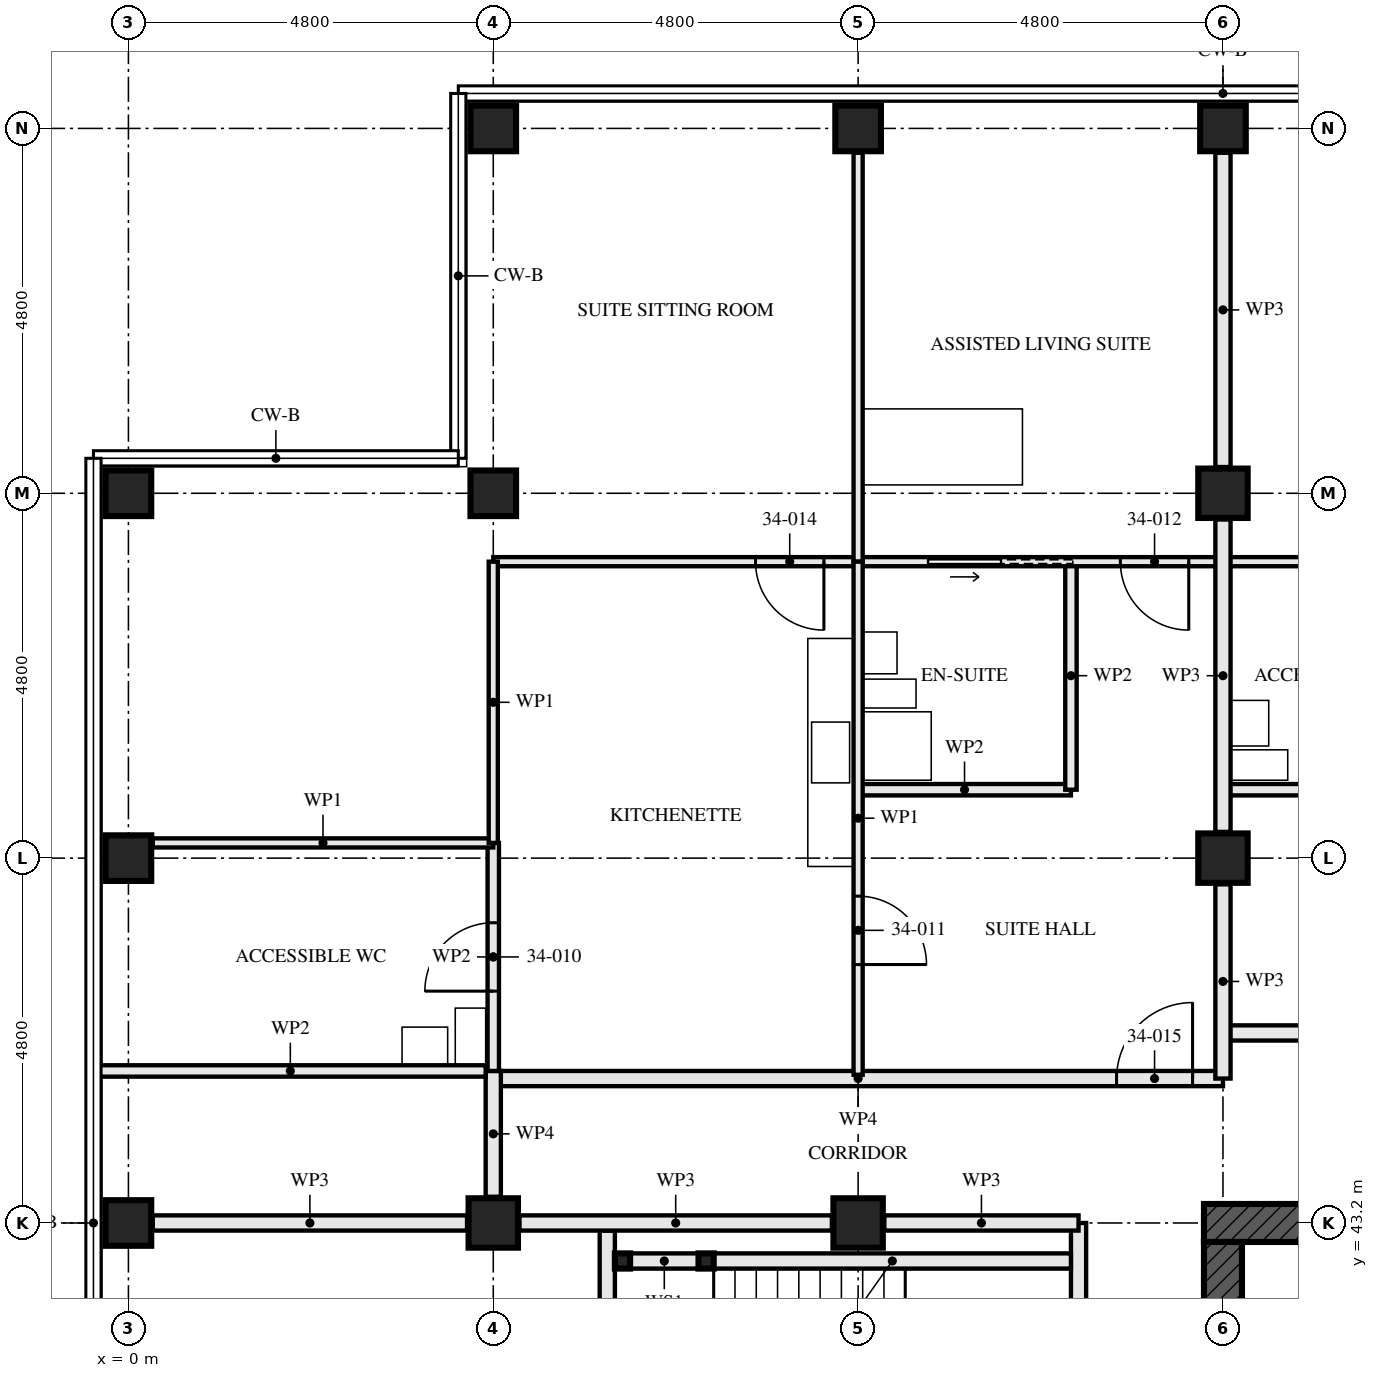
"""IFC4 building model, lengths in metres.
Left out: names, types, materials, properties, quantities, classifications, styles, units other than length and angle.
Written with IfcOpenShell. Run it as: python <this file> out.ifc"""

import sys

from ifc_helpers import new_model, si_unit, direction, frame, frame_2d, origin, origin_2d, place, context, subcontext, project, spatial, rectangle, hollow_rectangle, extrude, element, fill, save


model = new_model("IFC4")
c1 = context("Model", 3, precision=1e-05, world=origin(), true_north=direction((0.0, 1.0)))
c2 = subcontext(c1, "Body", "Model", "MODEL_VIEW")
j1 = project(units=[si_unit("LENGTHUNIT", "METRE"), si_unit("PLANEANGLEUNIT", "RADIAN")], contexts=[c1])
p1 = place(None, origin())
s1 = spatial("IfcSite", under=j1, at=p1, CompositionType="ELEMENT")
p2 = place(p1, origin())
s2 = spatial("IfcBuilding", under=s1, at=p2, CompositionType="ELEMENT")
p3 = place(p2, frame((0.0, 0.0, 126.0)))
s3 = spatial("IfcBuildingStorey", under=s2, at=p3, CompositionType="ELEMENT", Elevation=126.0)
for number, where, z_axis, x_axis in (
    (1, (0.0, 43.2, 0.0), (0.0, 0.0, 1.0), (0.0, 1.0, 0.0)),
    (2, (0.0, 48.0, 0.0), (0.0, 0.0, 1.0), (1.0, 0.0, 0.0)),
    (3, (0.0, 52.8, 0.0), (0.0, 0.0, 1.0), (0.0, 1.0, 0.0)),
):
    element("IfcColumn", number, at=place(p3, frame(where, z_axis=z_axis, x_axis=x_axis)), inside=s3, PredefinedType="COLUMN", context=c2, shape_type="SweptSolid", body=[
        extrude(hollow_rectangle(XDim=0.6, YDim=0.6, WallThickness=0.08, at=origin_2d()), origin(), (0.0, 0.0, 1.0), 3.5),
    ])
p4 = place(p3, frame((4.8, 43.2, 0.0), z_axis=(0.0, 0.0, 1.0), x_axis=(0.0, 1.0, 0.0)))
e4 = element("IfcColumn", 4, at=p4, inside=s3, PredefinedType="COLUMN", context=c2, shape_type="SweptSolid", body=[
    extrude(hollow_rectangle(XDim=0.65, YDim=0.65, WallThickness=0.05, at=origin_2d()), origin(), (0.0, 0.0, 1.0), 3.5),
])
for number, where, z_axis, x_axis in (
    (5, (4.8, 52.8, 0.0), (0.0, 0.0, 1.0), (0.0, 1.0, 0.0)),
    (6, (4.8, 57.6, 0.0), (0.0, 0.0, 1.0), (0.0, 1.0, 0.0)),
):
    element("IfcColumn", number, at=place(p3, frame(where, z_axis=z_axis, x_axis=x_axis)), inside=s3, PredefinedType="COLUMN", context=c2, shape_type="SweptSolid", body=[
        extrude(hollow_rectangle(XDim=0.6, YDim=0.6, WallThickness=0.08, at=origin_2d()), origin(), (0.0, 0.0, 1.0), 3.5),
    ])
p5 = place(p3, frame((9.6, 43.2, 0.0), z_axis=(0.0, 0.0, 1.0), x_axis=(0.0, 1.0, 0.0)))
e7 = element("IfcColumn", 7, at=p5, inside=s3, PredefinedType="COLUMN", context=c2, shape_type="SweptSolid", body=[
    extrude(hollow_rectangle(XDim=0.65, YDim=0.65, WallThickness=0.05, at=origin_2d()), origin(), (0.0, 0.0, 1.0), 3.5),
])
p6 = place(p3, frame((9.6, 57.6, 0.0), z_axis=(0.0, 0.0, 1.0), x_axis=(0.0, 1.0, 0.0)))
e8 = element("IfcColumn", 8, at=p6, inside=s3, PredefinedType="COLUMN", context=c2, shape_type="SweptSolid", body=[
    extrude(hollow_rectangle(XDim=0.6, YDim=0.6, WallThickness=0.08, at=origin_2d()), origin(), (0.0, 0.0, 1.0), 3.5),
])
for number, where, z_axis, x_axis in (
    (9, (14.4, 48.0, 0.0), (0.0, 0.0, 1.0), (1.0, 0.0, 0.0)),
    (10, (14.4, 52.8, 0.0), (0.0, 0.0, 1.0), (1.0, 0.0, 0.0)),
):
    element("IfcColumn", number, at=place(p3, frame(where, z_axis=z_axis, x_axis=x_axis)), inside=s3, PredefinedType="COLUMN", context=c2, shape_type="SweptSolid", body=[
        extrude(hollow_rectangle(XDim=0.65, YDim=0.65, WallThickness=0.05, at=origin_2d()), origin(), (0.0, 0.0, 1.0), 3.5),
    ])
p7 = place(p3, frame((14.4, 57.6, 0.0), z_axis=(0.0, 0.0, 1.0), x_axis=(0.0, 1.0, 0.0)))
e11 = element("IfcColumn", 11, at=p7, inside=s3, PredefinedType="COLUMN", context=c2, shape_type="SweptSolid", body=[
    extrude(hollow_rectangle(XDim=0.6, YDim=0.6, WallThickness=0.08, at=origin_2d()), origin(), (0.0, 0.0, 1.0), 3.5),
])
p8 = place(p3, frame((29.05, 43.2, -0.17), z_axis=(0.0, 0.0, 1.0), x_axis=(-1.0, 0.0, 0.0)))
e12 = element("IfcWall", 12, at=p8, inside=s3, PredefinedType="SHEAR", context=c2, shape_type="SweptSolid", body=[
    extrude(rectangle(XDim=14.9, YDim=0.5, at=frame_2d((7.45, 0.0))), origin(), (0.0, 0.0, 1.0), 3.5),
])
p9 = place(p8, frame((6.85, 0.0, 0.17)))
e13 = element("IfcOpeningElement", 13, at=p9, cuts=e12, PredefinedType="OPENING", context=c2, shape_type="SweptSolid", body=[
    extrude(rectangle(XDim=1.2, YDim=2.1, at=frame_2d((0.6, 1.05))), frame((0.0, 0.26, 0.0), z_axis=(0.0, -1.0, 0.0), x_axis=(1.0, 0.0, 0.0)), (0.0, 0.0, 1.0), 0.521),
])
p10 = place(p3, frame((14.4, 42.95, -0.17), z_axis=(0.0, 0.0, 1.0), x_axis=(0.0, -1.0, 0.0)))
e14 = element("IfcWall", 14, at=p10, inside=s3, PredefinedType="SHEAR", context=c2, shape_type="SweptSolid", body=[
    extrude(rectangle(XDim=13.9, YDim=0.5, at=frame_2d((6.95, 0.0))), origin(), (0.0, 0.0, 1.0), 3.5),
])
p11 = place(p10, frame((6.35, 0.0, 0.17)))
e15 = element("IfcOpeningElement", 15, at=p11, cuts=e14, PredefinedType="OPENING", context=c2, shape_type="SweptSolid", body=[
    extrude(rectangle(XDim=1.2, YDim=2.1, at=frame_2d((0.6, 1.05))), frame((0.0, 0.26, 0.0), z_axis=(0.0, -1.0, 0.0), x_axis=(1.0, 0.0, 0.0)), (0.0, 0.0, 1.0), 0.521),
])
for number, where, z_axis, x_axis in (
    (16, (6.5, 42.7, 0.0), (0.0, 0.0, 1.0), (1.0, 0.0, 0.0)),
    (17, (7.6, 42.7, 0.0), (0.0, 0.0, 1.0), (1.0, 0.0, 0.0)),
):
    element("IfcColumn", number, at=place(p3, frame(where, z_axis=z_axis, x_axis=x_axis)), inside=s3, PredefinedType="COLUMN", context=c2, shape_type="SweptSolid", body=[
        extrude(hollow_rectangle(XDim=0.2, YDim=0.2, WallThickness=0.008, at=origin_2d()), origin(), (0.0, 0.0, 1.0), 3.33),
    ])
p12 = place(p3, frame((6.6, 42.7, 0.0), z_axis=(0.0, 0.0, 1.0), x_axis=(1.0, 0.0, 0.0)))
e18 = element("IfcWall", 18, at=p12, inside=s3, PredefinedType="SOLIDWALL", context=c2, shape_type="SweptSolid", body=[
    extrude(rectangle(XDim=0.9, YDim=0.2, at=frame_2d((0.45, 0.0))), origin(), (0.0, 0.0, 1.0), 2.99),
])
p13 = place(p3, frame((7.7, 42.7, 0.0), z_axis=(0.0, 0.0, 1.0), x_axis=(1.0, 0.0, 0.0)))
e19 = element("IfcWall", 19, at=p13, inside=s3, PredefinedType="SOLIDWALL", context=c2, shape_type="SweptSolid", body=[
    extrude(rectangle(XDim=4.7, YDim=0.2, at=frame_2d((2.35, 0.0))), origin(), (0.0, 0.0, 1.0), 2.99),
])
p14 = place(p3, frame((6.3, 43.1, 0.0), z_axis=(0.0, 0.0, 1.0), x_axis=(0.0, -1.0, 0.0)))
e20 = element("IfcWall", 20, at=p14, inside=s3, PredefinedType="SOLIDWALL", context=c2, shape_type="SweptSolid", body=[
    extrude(rectangle(XDim=3.3, YDim=0.2, at=frame_2d((1.65, 0.0))), origin(), (0.0, 0.0, 1.0), 3.33),
])
p15 = place(p3, frame((12.5, 43.2, 0.0), z_axis=(0.0, 0.0, 1.0), x_axis=(0.0, -1.0, 0.0)))
e21 = element("IfcWall", 21, at=p15, inside=s3, PredefinedType="PARTITIONING", context=c2, shape_type="SweptSolid", body=[
    extrude(rectangle(XDim=14.84, YDim=0.2, at=frame_2d((7.42, 0.0))), origin(), (0.0, 0.0, 1.0), 2.32),
])
p16 = place(p15, frame((1.4, 0.0, 0.0)))
e22 = element("IfcOpeningElement", 22, at=p16, cuts=e21, PredefinedType="OPENING", context=c2, shape_type="SweptSolid", body=[
    extrude(rectangle(XDim=1.0, YDim=2.1, at=frame_2d((0.5, 1.05))), frame((0.0, 0.111, 0.0), z_axis=(0.0, -1.0, 0.0), x_axis=(1.0, 0.0, 0.0)), (0.0, 0.0, 1.0), 0.221),
])
p17 = place(p15, frame((5.2, 0.0, 0.0)))
e23 = element("IfcOpeningElement", 23, at=p17, cuts=e21, PredefinedType="OPENING", context=c2, shape_type="SweptSolid", body=[
    extrude(rectangle(XDim=1.0, YDim=2.1, at=frame_2d((0.5, 1.05))), frame((0.0, 0.111, 0.0), z_axis=(0.0, -1.0, 0.0), x_axis=(1.0, 0.0, 0.0)), (0.0, 0.0, 1.0), 0.221),
])
p18 = place(p15, frame((13.0, 0.0, 0.0)))
e24 = element("IfcOpeningElement", 24, at=p18, cuts=e21, PredefinedType="OPENING", context=c2, shape_type="SweptSolid", body=[
    extrude(rectangle(XDim=1.0, YDim=2.1, at=frame_2d((0.5, 1.05))), frame((0.0, 0.111, 0.0), z_axis=(0.0, -1.0, 0.0), x_axis=(1.0, 0.0, 0.0)), (0.0, 0.0, 1.0), 0.221),
])
p19 = place(p3, frame((12.4, 51.9, 0.0), z_axis=(0.0, 0.0, 1.0), x_axis=(0.0, -1.0, 0.0)))
e25 = element("IfcWall", 25, at=p19, inside=s3, PredefinedType="PARTITIONING", context=c2, shape_type="SweptSolid", body=[
    extrude(rectangle(XDim=3.0, YDim=0.15, at=frame_2d((1.5, 0.0))), origin(), (0.0, 0.0, 1.0), 3.33),
])
p20 = place(p3, frame((12.4, 48.9, 0.0), z_axis=(0.0, 0.0, 1.0), x_axis=(-1.0, 0.0, 0.0)))
e26 = element("IfcWall", 26, at=p20, inside=s3, PredefinedType="PARTITIONING", context=c2, shape_type="SweptSolid", body=[
    extrude(rectangle(XDim=2.8, YDim=0.15, at=frame_2d((1.4, 0.0))), origin(), (0.0, 0.0, 1.0), 3.33),
])
p21 = place(p3, frame((4.8, 48.2, 0.0), z_axis=(0.0, 0.0, 1.0), x_axis=(0.0, -1.0, 0.0)))
e27 = element("IfcWall", 27, at=p21, inside=s3, PredefinedType="PARTITIONING", context=c2, shape_type="SweptSolid", body=[
    extrude(rectangle(XDim=3.0, YDim=0.15, at=frame_2d((1.5, 0.0))), origin(), (0.0, 0.0, 1.0), 2.55),
])
p22 = place(p21, frame((1.05, 0.0, 0.0)))
e28 = element("IfcOpeningElement", 28, at=p22, cuts=e27, PredefinedType="OPENING", context=c2, shape_type="SweptSolid", body=[
    extrude(rectangle(XDim=0.9, YDim=2.1, at=frame_2d((0.45, 1.05))), frame((0.0, 0.085, 0.0), z_axis=(0.0, -1.0, 0.0), x_axis=(1.0, 0.0, 0.0)), (0.0, 0.0, 1.0), 0.171),
])
p23 = place(p3, frame((9.6, 51.9, 0.0), z_axis=(0.0, 0.0, 1.0), x_axis=(0.0, -1.0, 0.0)))
e29 = element("IfcWall", 29, at=p23, inside=s3, PredefinedType="PARTITIONING", context=c2, shape_type="SweptSolid", body=[
    extrude(rectangle(XDim=6.75, YDim=0.12, at=frame_2d((3.375, 0.0))), origin(), (0.0, 0.0, 1.0), 2.55),
])
p24 = place(p23, frame((4.4, 0.0, 0.0)))
e30 = element("IfcOpeningElement", 30, at=p24, cuts=e29, PredefinedType="OPENING", context=c2, shape_type="SweptSolid", body=[
    extrude(rectangle(XDim=0.9, YDim=2.1, at=frame_2d((0.45, 1.05))), frame((0.0, 0.071, 0.0), z_axis=(0.0, -1.0, 0.0), x_axis=(1.0, 0.0, 0.0)), (0.0, 0.0, 1.0), 0.141),
])
p25 = place(p3, frame((14.4, 51.9, 0.0), z_axis=(0.0, 0.0, 1.0), x_axis=(-1.0, 0.0, 0.0)))
e31 = element("IfcWall", 31, at=p25, inside=s3, PredefinedType="PARTITIONING", context=c2, shape_type="SweptSolid", body=[
    extrude(rectangle(XDim=4.8, YDim=0.12, at=frame_2d((2.4, 0.0))), origin(), (0.0, 0.0, 1.0), 3.33),
])
p26 = place(p25, frame((0.45, 0.0, 0.0)))
e32 = element("IfcOpeningElement", 32, at=p26, cuts=e31, PredefinedType="OPENING", context=c2, shape_type="SweptSolid", body=[
    extrude(rectangle(XDim=0.9, YDim=2.1, at=frame_2d((0.45, 1.05))), frame((0.0, 0.071, 0.0), z_axis=(0.0, -1.0, 0.0), x_axis=(1.0, 0.0, 0.0)), (0.0, 0.0, 1.0), 0.141),
])
p27 = place(p25, frame((2.925, 0.0, 0.0)))
e33 = element("IfcOpeningElement", 33, at=p27, cuts=e31, PredefinedType="OPENING", context=c2, shape_type="SweptSolid", body=[
    extrude(rectangle(XDim=0.95, YDim=2.1, at=frame_2d((0.475, 1.05))), frame((0.0, 0.071, 0.0), z_axis=(0.0, -1.0, 0.0), x_axis=(1.0, 0.0, 0.0)), (0.0, 0.0, 1.0), 0.141),
])
p28 = place(p3, frame((9.6, 51.9, 0.0), z_axis=(0.0, 0.0, 1.0), x_axis=(-1.0, 0.0, 0.0)))
e34 = element("IfcWall", 34, at=p28, inside=s3, PredefinedType="PARTITIONING", context=c2, shape_type="SweptSolid", body=[
    extrude(rectangle(XDim=4.8, YDim=0.12, at=frame_2d((2.4, 0.0))), origin(), (0.0, 0.0, 1.0), 3.33),
])
p29 = place(p28, frame((0.45, 0.0, 0.0)))
e35 = element("IfcOpeningElement", 35, at=p29, cuts=e34, PredefinedType="OPENING", context=c2, shape_type="SweptSolid", body=[
    extrude(rectangle(XDim=0.9, YDim=2.1, at=frame_2d((0.45, 1.05))), frame((0.0, 0.071, 0.0), z_axis=(0.0, -1.0, 0.0), x_axis=(1.0, 0.0, 0.0)), (0.0, 0.0, 1.0), 0.141),
])
p30 = place(p3, frame((4.8, 48.2, 0.0), z_axis=(0.0, 0.0, 1.0), x_axis=(-1.0, 0.0, 0.0)))
e36 = element("IfcWall", 36, at=p30, inside=s3, PredefinedType="PARTITIONING", context=c2, shape_type="SweptSolid", body=[
    extrude(rectangle(XDim=4.48, YDim=0.12, at=frame_2d((2.24, 0.0))), origin(), (0.0, 0.0, 1.0), 3.33),
])
p31 = place(p3, frame((9.6, 57.28, 0.0), z_axis=(0.0, 0.0, 1.0), x_axis=(0.0, -1.0, 0.0)))
e37 = element("IfcWall", 37, at=p31, inside=s3, PredefinedType="PARTITIONING", context=c2, shape_type="SweptSolid", body=[
    extrude(rectangle(XDim=5.38, YDim=0.12, at=frame_2d((2.69, 0.0))), origin(), (0.0, 0.0, 1.0), 2.55),
])
p32 = place(p3, frame((4.8, 51.9, 0.0), z_axis=(0.0, 0.0, 1.0), x_axis=(0.0, -1.0, 0.0)))
e38 = element("IfcWall", 38, at=p32, inside=s3, PredefinedType="PARTITIONING", context=c2, shape_type="SweptSolid", body=[
    extrude(rectangle(XDim=3.7, YDim=0.12, at=frame_2d((1.85, 0.0))), origin(), (0.0, 0.0, 1.0), 3.33),
])
p33 = place(p3, frame((14.4, 45.1, 0.0), z_axis=(0.0, 0.0, 1.0), x_axis=(-1.0, 0.0, 0.0)))
e39 = element("IfcWall", 39, at=p33, inside=s3, PredefinedType="PARTITIONING", context=c2, shape_type="SweptSolid", body=[
    extrude(rectangle(XDim=9.6, YDim=0.2, at=frame_2d((4.8, 0.0))), origin(), (0.0, 0.0, 1.0), 3.33),
])
p34 = place(p33, frame((0.4, 0.0, 0.0)))
e40 = element("IfcOpeningElement", 40, at=p34, cuts=e39, PredefinedType="OPENING", context=c2, shape_type="SweptSolid", body=[
    extrude(rectangle(XDim=1.0, YDim=2.1, at=frame_2d((0.5, 1.05))), frame((0.0, 0.111, 0.0), z_axis=(0.0, -1.0, 0.0), x_axis=(1.0, 0.0, 0.0)), (0.0, 0.0, 1.0), 0.221),
])
p35 = place(p3, frame((4.8, 45.2, 0.0), z_axis=(0.0, 0.0, 1.0), x_axis=(0.0, -1.0, 0.0)))
e41 = element("IfcWall", 41, at=p35, inside=s3, PredefinedType="PARTITIONING", context=c2, shape_type="SweptSolid", body=[
    extrude(rectangle(XDim=1.655, YDim=0.2, at=frame_2d((0.828, 0.0))), origin(), (0.0, 0.0, 1.0), 3.33),
])
p36 = place(p3, frame((17.2, 48.9, 0.0), z_axis=(0.0, 0.0, 1.0), x_axis=(-1.0, 0.0, 0.0)))
e42 = element("IfcWall", 42, at=p36, inside=s3, PredefinedType="PARTITIONING", context=c2, shape_type="SweptSolid", body=[
    extrude(rectangle(XDim=2.8, YDim=0.15, at=frame_2d((1.4, 0.0))), origin(), (0.0, 0.0, 1.0), 3.33),
])
p37 = place(p3, frame((19.2, 51.9, 0.0), z_axis=(0.0, 0.0, 1.0), x_axis=(-1.0, 0.0, 0.0)))
e43 = element("IfcWall", 43, at=p37, inside=s3, PredefinedType="PARTITIONING", context=c2, shape_type="SweptSolid", body=[
    extrude(rectangle(XDim=4.8, YDim=0.12, at=frame_2d((2.4, 0.0))), origin(), (0.0, 0.0, 1.0), 3.33),
])
p38 = place(p3, frame((29.24, 45.7, 0.0), z_axis=(0.0, 0.0, 1.0), x_axis=(-1.0, 0.0, 0.0)))
e44 = element("IfcWall", 44, at=p38, inside=s3, PredefinedType="PARTITIONING", context=c2, shape_type="SweptSolid", body=[
    extrude(rectangle(XDim=14.84, YDim=0.2, at=frame_2d((7.42, 0.0))), origin(), (0.0, 0.0, 1.0), 2.32),
])
p39 = place(p38, frame((5.64, 0.0, 0.0)))
e45 = element("IfcOpeningElement", 45, at=p39, cuts=e44, PredefinedType="OPENING", context=c2, shape_type="SweptSolid", body=[
    extrude(rectangle(XDim=1.0, YDim=2.1, at=frame_2d((0.5, 1.05))), frame((0.0, 0.111, 0.0), z_axis=(0.0, -1.0, 0.0), x_axis=(1.0, 0.0, 0.0)), (0.0, 0.0, 1.0), 0.221),
])
p40 = place(p3, frame((12.5, 43.2, 0.0), z_axis=(0.0, 0.0, 1.0), x_axis=(-1.0, 0.0, 0.0)))
e46 = element("IfcWall", 46, at=p40, inside=s3, PredefinedType="PARTITIONING", context=c2, shape_type="SweptSolid", body=[
    extrude(rectangle(XDim=2.555, YDim=0.2, at=frame_2d((1.277, 0.0))), origin(), (0.0, 0.0, 1.0), 2.32),
])
p41 = place(p3, frame((9.255, 43.2, 0.0), z_axis=(0.0, 0.0, 1.0), x_axis=(-1.0, 0.0, 0.0)))
e47 = element("IfcWall", 47, at=p41, inside=s3, PredefinedType="PARTITIONING", context=c2, shape_type="SweptSolid", body=[
    extrude(rectangle(XDim=4.11, YDim=0.2, at=frame_2d((2.055, 0.0))), origin(), (0.0, 0.0, 1.0), 2.32),
])
p42 = place(p3, frame((4.455, 43.2, 0.0), z_axis=(0.0, 0.0, 1.0), x_axis=(-1.0, 0.0, 0.0)))
e48 = element("IfcWall", 48, at=p42, inside=s3, PredefinedType="PARTITIONING", context=c2, shape_type="SweptSolid", body=[
    extrude(rectangle(XDim=4.135, YDim=0.2, at=frame_2d((2.067, 0.0))), origin(), (0.0, 0.0, 1.0), 2.32),
])
p43 = place(p3, frame((14.4, 45.1, 0.0), z_axis=(0.0, 0.0, 1.0), x_axis=(0.0, 1.0, 0.0)))
e49 = element("IfcWall", 49, at=p43, inside=s3, PredefinedType="PARTITIONING", context=c2, shape_type="SweptSolid", body=[
    extrude(rectangle(XDim=2.555, YDim=0.2, at=frame_2d((1.277, 0.0))), origin(), (0.0, 0.0, 1.0), 2.32),
])
p44 = place(p3, frame((14.4, 48.345, 0.0), z_axis=(0.0, 0.0, 1.0), x_axis=(0.0, 1.0, 0.0)))
e50 = element("IfcWall", 50, at=p44, inside=s3, PredefinedType="PARTITIONING", context=c2, shape_type="SweptSolid", body=[
    extrude(rectangle(XDim=4.11, YDim=0.2, at=frame_2d((2.055, 0.0))), origin(), (0.0, 0.0, 1.0), 2.32),
])
p45 = place(p3, frame((14.4, 53.145, 0.0), z_axis=(0.0, 0.0, 1.0), x_axis=(0.0, 1.0, 0.0)))
e51 = element("IfcWall", 51, at=p45, inside=s3, PredefinedType="PARTITIONING", context=c2, shape_type="SweptSolid", body=[
    extrude(rectangle(XDim=4.135, YDim=0.2, at=frame_2d((2.067, 0.0))), origin(), (0.0, 0.0, 1.0), 2.32),
])
p46 = place(p3, frame((4.7, 45.2, 0.0), z_axis=(0.0, 0.0, 1.0), x_axis=(-1.0, 0.0, 0.0)))
e52 = element("IfcWall", 52, at=p46, inside=s3, PredefinedType="PARTITIONING", context=c2, shape_type="SweptSolid", body=[
    extrude(rectangle(XDim=5.14, YDim=0.15, at=frame_2d((2.57, 0.0))), origin(), (0.0, 0.0, 1.0), 2.32),
])
p47 = place(p22, frame((0.9, 0.0, 0.0), z_axis=(0.0, 0.0, 1.0), x_axis=(-1.0, 0.0, 0.0)))
e53 = element("IfcDoor", 53, at=p47, inside=s3, OperationType="SINGLE_SWING_RIGHT", PredefinedType="DOOR", context=c2, shape_type="SweptSolid", body=[
    extrude(rectangle(XDim=0.9, YDim=2.1, at=frame_2d((0.45, 1.05))), frame((0.0, 0.022, 0.0), z_axis=(0.0, -1.0, 0.0), x_axis=(1.0, 0.0, 0.0)), (0.0, 0.0, 1.0), 0.044),
])
fill(e28, e53)
p48 = place(p24, origin())
e54 = element("IfcDoor", 54, at=p48, inside=s3, OperationType="SINGLE_SWING_LEFT", PredefinedType="DOOR", context=c2, shape_type="SweptSolid", body=[
    extrude(rectangle(XDim=0.9, YDim=2.1, at=frame_2d((0.45, 1.05))), frame((0.0, 0.022, 0.0), z_axis=(0.0, -1.0, 0.0), x_axis=(1.0, 0.0, 0.0)), (0.0, 0.0, 1.0), 0.044),
])
fill(e30, e54)
p49 = place(p26, origin())
e55 = element("IfcDoor", 55, at=p49, inside=s3, OperationType="SINGLE_SWING_RIGHT", PredefinedType="DOOR", context=c2, shape_type="SweptSolid", body=[
    extrude(rectangle(XDim=0.9, YDim=2.1, at=frame_2d((0.45, 1.05))), frame((0.0, 0.022, 0.0), z_axis=(0.0, -1.0, 0.0), x_axis=(1.0, 0.0, 0.0)), (0.0, 0.0, 1.0), 0.044),
])
fill(e32, e55)
p50 = place(p27, origin())
e56 = element("IfcDoor", 56, at=p50, inside=s3, OperationType="SLIDING_TO_RIGHT", PredefinedType="DOOR", context=c2, shape_type="SweptSolid", body=[
    extrude(rectangle(XDim=0.95, YDim=2.1, at=frame_2d((0.475, 1.05))), frame((0.0, 0.022, 0.0), z_axis=(0.0, -1.0, 0.0), x_axis=(1.0, 0.0, 0.0)), (0.0, 0.0, 1.0), 0.044),
])
fill(e33, e56)
p51 = place(p29, origin())
e57 = element("IfcDoor", 57, at=p51, inside=s3, OperationType="SINGLE_SWING_RIGHT", PredefinedType="DOOR", context=c2, shape_type="SweptSolid", body=[
    extrude(rectangle(XDim=0.9, YDim=2.1, at=frame_2d((0.45, 1.05))), frame((0.0, 0.022, 0.0), z_axis=(0.0, -1.0, 0.0), x_axis=(1.0, 0.0, 0.0)), (0.0, 0.0, 1.0), 0.044),
])
fill(e35, e57)
p52 = place(p34, frame((1.0, 0.0, 0.0), z_axis=(0.0, 0.0, 1.0), x_axis=(-1.0, 0.0, 0.0)))
e58 = element("IfcDoor", 58, at=p52, inside=s3, OperationType="SINGLE_SWING_LEFT", PredefinedType="DOOR", context=c2, shape_type="SweptSolid", body=[
    extrude(rectangle(XDim=1.0, YDim=2.1, at=frame_2d((0.5, 1.05))), frame((0.0, 0.027, 0.0), z_axis=(0.0, -1.0, 0.0), x_axis=(1.0, 0.0, 0.0)), (0.0, 0.0, 1.0), 0.054),
])
fill(e40, e58)
save(model, sys.argv[1])
